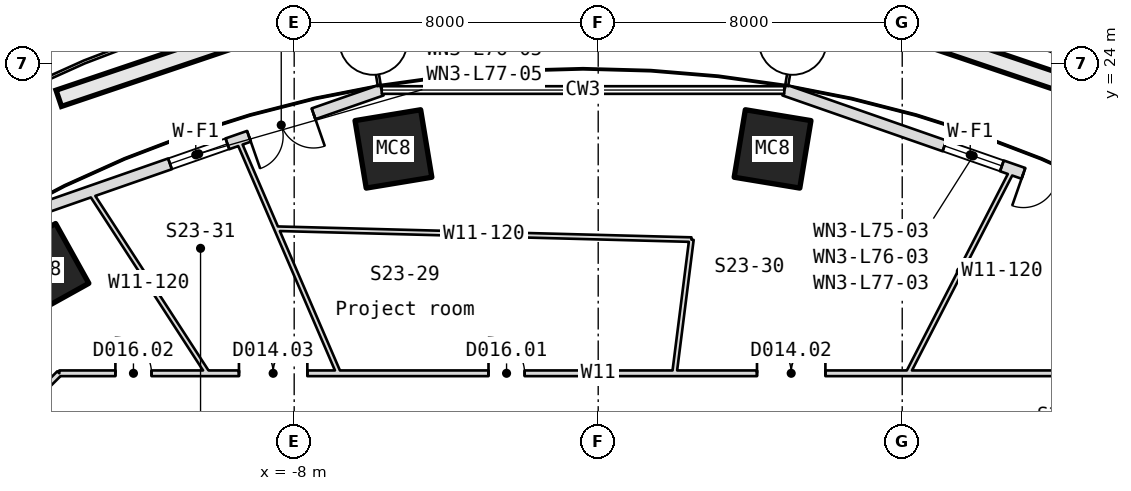
"""IFC4 building model, lengths in metres.
Left out: names, types, materials, properties, quantities, classifications, styles, units other than length and angle.
Written with IfcOpenShell. Run it as: python <this file> out.ifc"""

import sys

from ifc_helpers import new_model, si_unit, direction, frame, frame_2d, origin, origin_2d, place, context, subcontext, project, spatial, rectangle, hollow_rectangle, extrude, element, fill, save


model = new_model("IFC4")
c1 = context("Model", 3, precision=1e-05, world=origin(), true_north=direction((0.0, 1.0)))
c2 = subcontext(c1, "Body", "Model", "MODEL_VIEW")
j1 = project(units=[si_unit("LENGTHUNIT", "METRE"), si_unit("PLANEANGLEUNIT", "RADIAN")], contexts=[c1])
p1 = place(None, origin())
s1 = spatial("IfcSite", under=j1, at=p1, CompositionType="ELEMENT")
p2 = place(p1, origin())
s2 = spatial("IfcBuilding", under=s1, at=p2, CompositionType="ELEMENT")
p3 = place(p2, frame((0.0, 0.0, 334.3)))
s3 = spatial("IfcBuildingStorey", under=s2, at=p3, CompositionType="ELEMENT", Elevation=334.3)
for number, where, z_axis, x_axis in (
    (1, (4.588, 21.753, -0.18), (0.0, 0.0, 1.0), (0.987, -0.163, 0.0)),
    (2, (-5.388, 21.753, -0.18), (0.0, 0.0, 1.0), (0.987, 0.163, 0.0)),
    (3, (-14.605, 18.579, -0.18), (0.0, 0.0, 1.0), (0.874, 0.486, 0.0)),
):
    element("IfcColumn", number, at=place(p3, frame(where, z_axis=z_axis, x_axis=x_axis)), inside=s3, PredefinedType="COLUMN", context=c2, shape_type="SweptSolid", body=[
        extrude(hollow_rectangle(XDim=1.75, YDim=1.8, WallThickness=0.055, at=origin_2d()), origin(), (0.0, 0.0, 1.0), 4.15),
    ])
p4 = place(p3, frame((14.683, 19.892, 0.0), z_axis=(0.0, 0.0, 1.0), x_axis=(-0.944291634301, 0.329109874341, 0.0)))
e4 = element("IfcWall", 4, at=p4, inside=s3, PredefinedType="SOLIDWALL", context=c2, shape_type="SweptSolid", body=[
    extrude(rectangle(XDim=10.364, YDim=0.3, at=frame_2d((5.182, 0.0))), origin(), (0.0, 0.0, 1.0), 3.97),
])
p5 = place(p4, frame((1.9, 0.0, 0.0)))
e5 = element("IfcOpeningElement", 5, at=p5, cuts=e4, PredefinedType="OPENING", context=c2, shape_type="SweptSolid", body=[
    extrude(rectangle(XDim=1.8, YDim=2.4, at=frame_2d((0.9, 1.2))), frame((0.0, 0.16, 0.0), z_axis=(0.0, -1.0, 0.0), x_axis=(1.0, 0.0, 0.0)), (0.0, 0.0, 1.0), 0.32),
])
p6 = place(p4, frame((4.3, 0.0, 0.9)))
e6 = element("IfcOpeningElement", 6, at=p6, cuts=e4, PredefinedType="OPENING", context=c2, shape_type="SweptSolid", body=[
    extrude(rectangle(XDim=1.6, YDim=1.5, at=frame_2d((0.8, 0.75))), frame((0.0, 0.16, 0.0), z_axis=(0.0, -1.0, 0.0), x_axis=(1.0, 0.0, 0.0)), (0.0, 0.0, 1.0), 0.32),
])
p7 = place(p3, frame((-5.697, 23.303, 0.0), z_axis=(0.0, 0.0, 1.0), x_axis=(-0.944298954957, -0.32908886895, 0.0)))
e7 = element("IfcWall", 7, at=p7, inside=s3, PredefinedType="SOLIDWALL", context=c2, shape_type="SweptSolid", body=[
    extrude(rectangle(XDim=10.364, YDim=0.3, at=frame_2d((5.182, 0.0))), origin(), (0.0, 0.0, 1.0), 3.97),
])
p8 = place(p7, frame((1.9, 0.0, 0.0)))
e8 = element("IfcOpeningElement", 8, at=p8, cuts=e7, PredefinedType="OPENING", context=c2, shape_type="SweptSolid", body=[
    extrude(rectangle(XDim=1.8, YDim=2.4, at=frame_2d((0.9, 1.2))), frame((0.0, 0.16, 0.0), z_axis=(0.0, -1.0, 0.0), x_axis=(1.0, 0.0, 0.0)), (0.0, 0.0, 1.0), 0.32),
])
p9 = place(p7, frame((4.3, 0.0, 0.9)))
e9 = element("IfcOpeningElement", 9, at=p9, cuts=e7, PredefinedType="OPENING", context=c2, shape_type="SweptSolid", body=[
    extrude(rectangle(XDim=1.6, YDim=1.5, at=frame_2d((0.8, 0.75))), frame((0.0, 0.16, 0.0), z_axis=(0.0, -1.0, 0.0), x_axis=(1.0, 0.0, 0.0)), (0.0, 0.0, 1.0), 0.32),
])
p10 = place(p3, frame((-18.85, 11.18, 0.0), z_axis=(0.0, 0.0, 1.0), x_axis=(0.707106781187, 0.707106781187, 0.0)))
e10 = element("IfcWall", 10, at=p10, inside=s3, PredefinedType="PARTITIONING", context=c2, shape_type="SweptSolid", body=[
    extrude(rectangle(XDim=6.604, YDim=0.15, at=frame_2d((3.302, 0.0))), origin(), (0.0, 0.0, 1.0), 3.97),
])
p11 = place(p10, frame((1.503, 0.0, 0.0)))
e11 = element("IfcOpeningElement", 11, at=p11, cuts=e10, PredefinedType="OPENING", context=c2, shape_type="SweptSolid", body=[
    extrude(rectangle(XDim=0.95, YDim=2.1, at=frame_2d((0.475, 1.05))), frame((0.0, 0.085, 0.0), z_axis=(0.0, -1.0, 0.0), x_axis=(1.0, 0.0, 0.0)), (0.0, 0.0, 1.0), 0.17),
])
p12 = place(p3, frame((-14.18, 15.85, 0.0), z_axis=(0.0, 0.0, 1.0), x_axis=(1.0, 0.0, 0.0)))
e12 = element("IfcWall", 12, at=p12, inside=s3, PredefinedType="PARTITIONING", context=c2, shape_type="SweptSolid", body=[
    extrude(rectangle(XDim=28.361, YDim=0.15, at=frame_2d((14.18, 0.0))), origin(), (0.0, 0.0, 1.0), 3.97),
])
p13 = place(p12, frame((11.294, 0.0, 0.0)))
e13 = element("IfcOpeningElement", 13, at=p13, cuts=e12, PredefinedType="OPENING", context=c2, shape_type="SweptSolid", body=[
    extrude(rectangle(XDim=0.95, YDim=2.1, at=frame_2d((0.475, 1.05))), frame((0.0, 0.085, 0.0), z_axis=(0.0, -1.0, 0.0), x_axis=(1.0, 0.0, 0.0)), (0.0, 0.0, 1.0), 0.17),
])
p14 = place(p12, frame((18.359, 0.0, 0.0)))
e14 = element("IfcOpeningElement", 14, at=p14, cuts=e12, PredefinedType="OPENING", context=c2, shape_type="SweptSolid", body=[
    extrude(rectangle(XDim=1.8, YDim=2.1, at=frame_2d((0.9, 1.05))), frame((0.0, 0.085, 0.0), z_axis=(0.0, -1.0, 0.0), x_axis=(1.0, 0.0, 0.0)), (0.0, 0.0, 1.0), 0.17),
])
p15 = place(p12, frame((4.727, 0.0, 0.0)))
e15 = element("IfcOpeningElement", 15, at=p15, cuts=e12, PredefinedType="OPENING", context=c2, shape_type="SweptSolid", body=[
    extrude(rectangle(XDim=1.8, YDim=2.1, at=frame_2d((0.9, 1.05))), frame((0.0, 0.085, 0.0), z_axis=(0.0, -1.0, 0.0), x_axis=(1.0, 0.0, 0.0)), (0.0, 0.0, 1.0), 0.17),
])
p16 = place(p12, frame((1.476, 0.0, 0.0)))
e16 = element("IfcOpeningElement", 16, at=p16, cuts=e12, PredefinedType="OPENING", context=c2, shape_type="SweptSolid", body=[
    extrude(rectangle(XDim=0.95, YDim=2.1, at=frame_2d((0.475, 1.05))), frame((0.0, 0.085, 0.0), z_axis=(0.0, -1.0, 0.0), x_axis=(1.0, 0.0, 0.0)), (0.0, 0.0, 1.0), 0.17),
])
p17 = place(p3, frame((-10.278, 15.85, 0.0), z_axis=(0.0, 0.0, 1.0), x_axis=(-0.544086684893, 0.839029009822, 0.0)))
e17 = element("IfcWall", 17, at=p17, inside=s3, PredefinedType="PARTITIONING", context=c2, shape_type="SweptSolid", body=[
    extrude(rectangle(XDim=5.693, YDim=0.12, at=frame_2d((2.847, 0.0))), origin(), (0.0, 0.0, 1.0), 3.97),
])
p18 = place(p3, frame((-6.83, 15.85, 0.0), z_axis=(0.0, 0.0, 1.0), x_axis=(-0.39569122033, 0.918383611654, 0.0)))
e18 = element("IfcWall", 18, at=p18, inside=s3, PredefinedType="PARTITIONING", context=c2, shape_type="SweptSolid", body=[
    extrude(rectangle(XDim=6.682, YDim=0.12, at=frame_2d((3.341, 0.0))), origin(), (0.0, 0.0, 1.0), 3.97),
])
p19 = place(p3, frame((2.453, 19.367, 0.0), z_axis=(0.0, 0.0, 1.0), x_axis=(-0.999654058519, 0.026301393246, 0.0)))
e19 = element("IfcWall", 19, at=p19, inside=s3, PredefinedType="PARTITIONING", context=c2, shape_type="SweptSolid", body=[
    extrude(rectangle(XDim=10.925, YDim=0.12, at=frame_2d((5.463, 0.0))), origin(), (0.0, 0.0, 1.0), 3.97),
])
p20 = place(p3, frame((2.453, 19.367, 0.0), z_axis=(0.0, 0.0, 1.0), x_axis=(-0.125670265883, -0.992072066068, 0.0)))
e20 = element("IfcWall", 20, at=p20, inside=s3, PredefinedType="PARTITIONING", context=c2, shape_type="SweptSolid", body=[
    extrude(rectangle(XDim=3.545, YDim=0.12, at=frame_2d((1.773, 0.0))), origin(), (0.0, 0.0, 1.0), 3.97),
])
p21 = place(p3, frame((8.15, 15.85, 0.0), z_axis=(0.0, 0.0, 1.0), x_axis=(0.457314139227, 0.889305222105, 0.0)))
e21 = element("IfcWall", 21, at=p21, inside=s3, PredefinedType="PARTITIONING", context=c2, shape_type="SweptSolid", body=[
    extrude(rectangle(XDim=6.026, YDim=0.12, at=frame_2d((3.013, 0.0))), origin(), (0.0, 0.0, 1.0), 3.97),
])
p22 = place(p5, origin())
e22 = element("IfcDoor", 22, at=p22, inside=s3, OperationType="SINGLE_SWING_LEFT", PredefinedType="DOOR", context=c2, shape_type="SweptSolid", body=[
    extrude(rectangle(XDim=1.8, YDim=2.4, at=frame_2d((0.9, 1.2))), frame((0.0, 0.025, 0.0), z_axis=(0.0, -1.0, 0.0), x_axis=(1.0, 0.0, 0.0)), (0.0, 0.0, 1.0), 0.05),
])
fill(e5, e22)
p23 = place(p6, origin())
e23 = element("IfcWindow", 23, at=p23, inside=s3, PartitioningType="SINGLE_PANEL", PredefinedType="WINDOW", context=c2, shape_type="SweptSolid", body=[
    extrude(rectangle(XDim=1.6, YDim=1.5, at=frame_2d((0.8, 0.75))), frame((0.0, 0.03, 0.0), z_axis=(0.0, -1.0, 0.0), x_axis=(1.0, 0.0, 0.0)), (0.0, 0.0, 1.0), 0.06),
])
fill(e6, e23)
p24 = place(p8, origin())
e24 = element("IfcDoor", 24, at=p24, inside=s3, OperationType="SINGLE_SWING_LEFT", PredefinedType="DOOR", context=c2, shape_type="SweptSolid", body=[
    extrude(rectangle(XDim=1.8, YDim=2.4, at=frame_2d((0.9, 1.2))), frame((0.0, 0.025, 0.0), z_axis=(0.0, -1.0, 0.0), x_axis=(1.0, 0.0, 0.0)), (0.0, 0.0, 1.0), 0.05),
])
fill(e8, e24)
p25 = place(p9, origin())
e25 = element("IfcWindow", 25, at=p25, inside=s3, PartitioningType="SINGLE_PANEL", PredefinedType="WINDOW", context=c2, shape_type="SweptSolid", body=[
    extrude(rectangle(XDim=1.6, YDim=1.5, at=frame_2d((0.8, 0.75))), frame((0.0, 0.03, 0.0), z_axis=(0.0, -1.0, 0.0), x_axis=(1.0, 0.0, 0.0)), (0.0, 0.0, 1.0), 0.06),
])
fill(e9, e25)
p26 = place(p13, origin())
e26 = element("IfcDoor", 26, at=p26, inside=s3, OperationType="SINGLE_SWING_RIGHT", PredefinedType="DOOR", context=c2, shape_type="SweptSolid", body=[
    extrude(rectangle(XDim=0.95, YDim=2.1, at=frame_2d((0.475, 1.05))), frame((0.0, 0.025, 0.0), z_axis=(0.0, -1.0, 0.0), x_axis=(1.0, 0.0, 0.0)), (0.0, 0.0, 1.0), 0.05),
])
fill(e13, e26)
p27 = place(p14, origin())
e27 = element("IfcDoor", 27, at=p27, inside=s3, OperationType="DOUBLE_DOOR_SINGLE_SWING", PredefinedType="DOOR", context=c2, shape_type="SweptSolid", body=[
    extrude(rectangle(XDim=1.8, YDim=2.1, at=frame_2d((0.9, 1.05))), frame((0.0, 0.025, 0.0), z_axis=(0.0, -1.0, 0.0), x_axis=(1.0, 0.0, 0.0)), (0.0, 0.0, 1.0), 0.05),
])
fill(e14, e27)
p28 = place(p15, origin())
e28 = element("IfcDoor", 28, at=p28, inside=s3, OperationType="DOUBLE_DOOR_SINGLE_SWING", PredefinedType="DOOR", context=c2, shape_type="SweptSolid", body=[
    extrude(rectangle(XDim=1.8, YDim=2.1, at=frame_2d((0.9, 1.05))), frame((0.0, 0.025, 0.0), z_axis=(0.0, -1.0, 0.0), x_axis=(1.0, 0.0, 0.0)), (0.0, 0.0, 1.0), 0.05),
])
fill(e15, e28)
p29 = place(p16, origin())
e29 = element("IfcDoor", 29, at=p29, inside=s3, OperationType="SINGLE_SWING_RIGHT", PredefinedType="DOOR", context=c2, shape_type="SweptSolid", body=[
    extrude(rectangle(XDim=0.95, YDim=2.1, at=frame_2d((0.475, 1.05))), frame((0.0, 0.025, 0.0), z_axis=(0.0, -1.0, 0.0), x_axis=(1.0, 0.0, 0.0)), (0.0, 0.0, 1.0), 0.05),
])
fill(e16, e29)
save(model, sys.argv[1])
